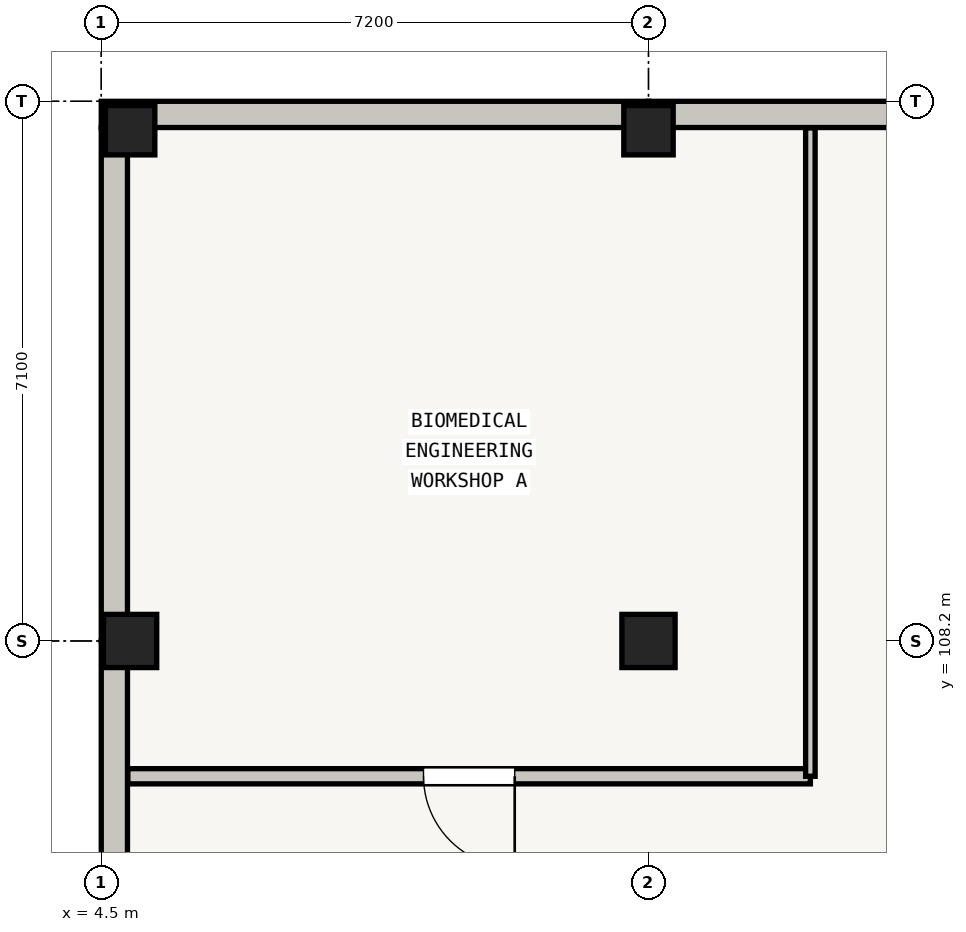
"""IFC4 building model, lengths in metres.
Left out: names, types, materials, properties, quantities, classifications, styles, units other than length and angle.
Written with IfcOpenShell. Run it as: python <this file> out.ifc"""

import sys

from ifc_helpers import new_model, si_unit, direction, frame, frame_2d, origin, origin_2d, place, context, subcontext, project, spatial, rectangle, extrude, element, fill, save


model = new_model("IFC4")
c1 = context("Model", 3, precision=1e-05, world=origin(), true_north=direction((0.0, 1.0)))
c2 = subcontext(c1, "Body", "Model", "MODEL_VIEW")
j1 = project(units=[si_unit("LENGTHUNIT", "METRE"), si_unit("PLANEANGLEUNIT", "RADIAN")], contexts=[c1])
p1 = place(None, origin())
s1 = spatial("IfcSite", under=j1, at=p1, CompositionType="ELEMENT")
p2 = place(p1, origin())
s2 = spatial("IfcBuilding", under=s1, at=p2, CompositionType="ELEMENT")
p3 = place(p2, frame((0.0, 0.0, -4.5)))
s3 = spatial("IfcBuildingStorey", under=s2, at=p3, CompositionType="ELEMENT", Elevation=-4.5)
p4 = place(p3, frame((4.88, 108.2, -0.42), z_axis=(0.0, 0.0, 1.0), x_axis=(1.0, 0.0, 0.0)))
e1 = element("IfcColumn", 1, at=p4, inside=s3, PredefinedType="COLUMN", context=c2, shape_type="SweptSolid", body=[
    extrude(rectangle(XDim=0.7, YDim=0.7, at=origin_2d()), origin(), (0.0, 0.0, 1.0), 4.655),
])
p5 = place(p3, frame((4.88, 114.92, -0.42), z_axis=(0.0, 0.0, 1.0), x_axis=(1.0, 0.0, 0.0)))
e2 = element("IfcColumn", 2, at=p5, inside=s3, PredefinedType="COLUMN", context=c2, shape_type="SweptSolid", body=[
    extrude(rectangle(XDim=0.65, YDim=0.65, at=origin_2d()), origin(), (0.0, 0.0, 1.0), 4.655),
])
p6 = place(p3, frame((11.7, 108.2, -0.42), z_axis=(0.0, 0.0, 1.0), x_axis=(1.0, 0.0, 0.0)))
e3 = element("IfcColumn", 3, at=p6, inside=s3, PredefinedType="COLUMN", context=c2, shape_type="SweptSolid", body=[
    extrude(rectangle(XDim=0.7, YDim=0.7, at=origin_2d()), origin(), (0.0, 0.0, 1.0), 4.655),
])
p7 = place(p3, frame((11.7, 114.92, -0.42), z_axis=(0.0, 0.0, 1.0), x_axis=(1.0, 0.0, 0.0)))
e4 = element("IfcColumn", 4, at=p7, inside=s3, PredefinedType="COLUMN", context=c2, shape_type="SweptSolid", body=[
    extrude(rectangle(XDim=0.65, YDim=0.65, at=origin_2d()), origin(), (0.0, 0.0, 1.0), 4.655),
])
p8 = place(p3, frame((4.5, 115.127, -0.42), z_axis=(0.0, 0.0, 1.0), x_axis=(1.0, 0.0, 0.0)))
e5 = element("IfcWall", 5, at=p8, inside=s3, PredefinedType="SOLIDWALL", context=c2, shape_type="SweptSolid", body=[
    extrude(rectangle(XDim=7.2, YDim=0.345, at=frame_2d((3.6, 0.0))), origin(), (0.0, 0.0, 1.0), 4.09),
])
p9 = place(p3, frame((11.7, 115.127, -0.42), z_axis=(0.0, 0.0, 1.0), x_axis=(1.0, 0.0, 0.0)))
e6 = element("IfcWall", 6, at=p9, inside=s3, PredefinedType="SOLIDWALL", context=c2, shape_type="SweptSolid", body=[
    extrude(rectangle(XDim=7.2, YDim=0.345, at=frame_2d((3.6, 0.0))), origin(), (0.0, 0.0, 1.0), 4.06),
])
p10 = place(p3, frame((4.673, 101.48, -0.42), z_axis=(0.0, 0.0, 1.0), x_axis=(0.0, 1.0, 0.0)))
e7 = element("IfcWall", 7, at=p10, inside=s3, PredefinedType="SOLIDWALL", context=c2, shape_type="SweptSolid", body=[
    extrude(rectangle(XDim=6.72, YDim=0.345, at=frame_2d((3.36, 0.0))), origin(), (0.0, 0.0, 1.0), 4.02),
])
p11 = place(p3, frame((4.673, 108.2, -0.42), z_axis=(0.0, 0.0, 1.0), x_axis=(0.0, 1.0, 0.0)))
e8 = element("IfcWall", 8, at=p11, inside=s3, PredefinedType="SOLIDWALL", context=c2, shape_type="SweptSolid", body=[
    extrude(rectangle(XDim=6.755, YDim=0.345, at=frame_2d((3.377, 0.0))), origin(), (0.0, 0.0, 1.0), 4.02),
])
p12 = place(p3, frame((13.83, 106.42, 0.0), z_axis=(0.0, 0.0, 1.0), x_axis=(-1.0, 0.0, 0.0)))
e9 = element("IfcWall", 9, at=p12, inside=s3, PredefinedType="SOLIDWALL", context=c2, shape_type="SweptSolid", body=[
    extrude(rectangle(XDim=8.98, YDim=0.2, at=frame_2d((4.49, 0.0))), origin(), (0.0, 0.0, 1.0), 3.255),
])
p13 = place(p12, frame((3.89, 0.0, 0.0)))
e10 = element("IfcOpeningElement", 10, at=p13, cuts=e9, PredefinedType="OPENING", context=c2, shape_type="SweptSolid", body=[
    extrude(rectangle(XDim=1.2, YDim=2.05, at=frame_2d((0.6, 1.025))), frame((0.0, 0.1, 0.0), z_axis=(0.0, -1.0, 0.0), x_axis=(1.0, 0.0, 0.0)), (0.0, 0.0, 1.0), 0.2),
])
p14 = place(p3, frame((13.83, 114.95, 0.0), z_axis=(0.0, 0.0, 1.0), x_axis=(0.0, -1.0, 0.0)))
e11 = element("IfcWall", 11, at=p14, inside=s3, PredefinedType="PARTITIONING", context=c2, shape_type="SweptSolid", body=[
    extrude(rectangle(XDim=8.53, YDim=0.125, at=frame_2d((4.265, 0.0))), origin(), (0.0, 0.0, 1.0), 3.255),
])
p15 = place(p13, origin())
e12 = element("IfcDoor", 12, at=p15, inside=s3, OperationType="SINGLE_SWING_LEFT", PredefinedType="DOOR", context=c2, shape_type="SweptSolid", body=[
    extrude(rectangle(XDim=1.2, YDim=2.05, at=frame_2d((0.6, 1.025))), frame((0.0, 0.025, 0.0), z_axis=(0.0, -1.0, 0.0), x_axis=(1.0, 0.0, 0.0)), (0.0, 0.0, 1.0), 0.05),
])
fill(e10, e12)
save(model, sys.argv[1])
